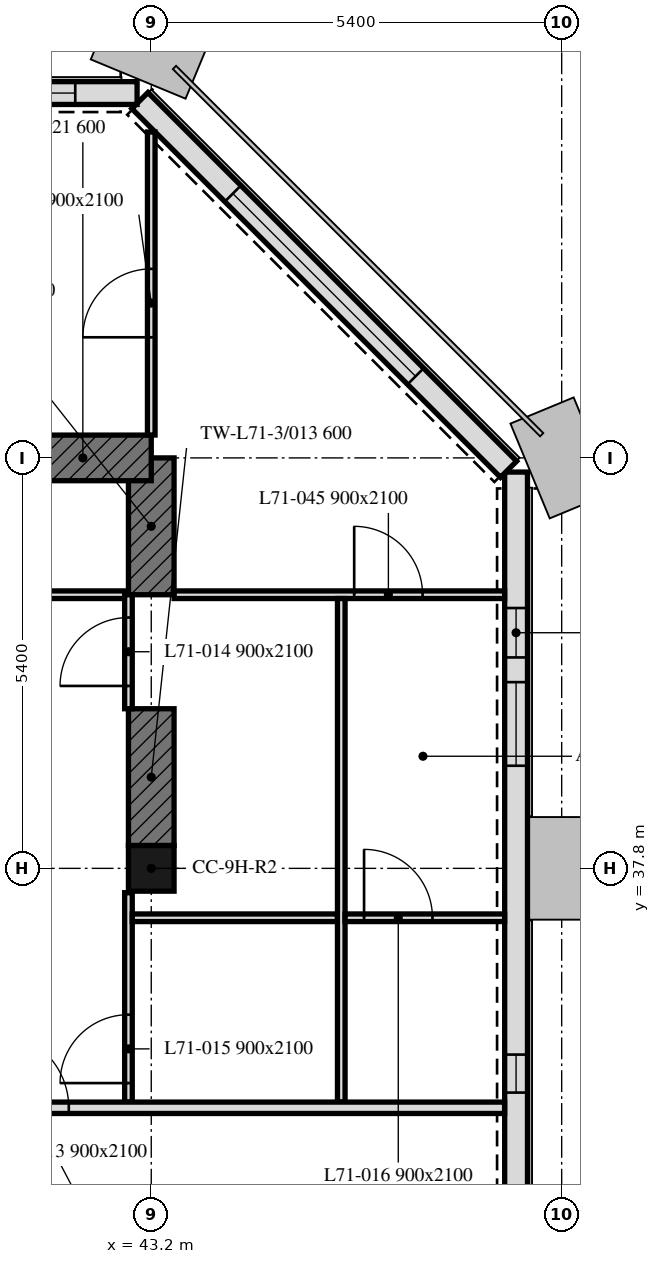
"""IFC4 building model, lengths in metres.
Left out: names, types, materials, properties, quantities, classifications, styles, units other than length and angle.
Written with IfcOpenShell. Run it as: python <this file> out.ifc"""

import sys

from ifc_helpers import new_model, si_unit, direction, frame, frame_2d, origin, origin_2d, place, context, subcontext, project, spatial, rectangle, extrude, element, fill, save


model = new_model("IFC4")
c1 = context("Model", 3, precision=1e-05, world=origin(), true_north=direction((0.0, 1.0)))
c2 = subcontext(c1, "Body", "Model", "MODEL_VIEW")
j1 = project(units=[si_unit("LENGTHUNIT", "METRE"), si_unit("PLANEANGLEUNIT", "RADIAN")], contexts=[c1])
p1 = place(None, origin())
s1 = spatial("IfcSite", under=j1, at=p1, CompositionType="ELEMENT")
p2 = place(p1, origin())
s2 = spatial("IfcBuilding", under=s1, at=p2, CompositionType="ELEMENT")
p3 = place(p2, frame((0.0, 0.0, 288.4)))
s3 = spatial("IfcBuildingStorey", under=s2, at=p3, CompositionType="ELEMENT", Elevation=288.4)
p4 = place(p3, frame((43.2, 37.8, 0.0), z_axis=(0.0, 0.0, 1.0), x_axis=(1.0, 0.0, 0.0)))
e1 = element("IfcColumn", 1, at=p4, inside=s3, PredefinedType="COLUMN", context=c2, shape_type="SweptSolid", body=[
    extrude(rectangle(XDim=0.6, YDim=0.6, at=origin_2d()), origin(), (0.0, 0.0, 1.0), 3.0),
])
p5 = place(p3, frame((43.2, 38.1, 0.0), z_axis=(0.0, 0.0, 1.0), x_axis=(0.0, 1.0, 0.0)))
e2 = element("IfcWall", 2, at=p5, inside=s3, PredefinedType="SHEAR", context=c2, shape_type="SweptSolid", body=[
    extrude(rectangle(XDim=1.8, YDim=0.6, at=frame_2d((0.9, 0.0))), origin(), (0.0, 0.0, 1.0), 3.0),
])
for number, where, z_axis, x_axis in (
    (3, (43.2, 41.4, 0.0), (0.0, 0.0, 1.0), (0.0, 1.0, 0.0)),
    (4, (41.4, 43.2, 0.0), (0.0, 0.0, 1.0), (1.0, 0.0, 0.0)),
):
    element("IfcWall", number, at=place(p3, frame(where, z_axis=z_axis, x_axis=x_axis)), inside=s3, PredefinedType="SHEAR", context=c2, shape_type="SweptSolid", body=[
        extrude(rectangle(XDim=1.8, YDim=0.6, at=frame_2d((0.9, 0.0))), origin(), (0.0, 0.0, 1.0), 3.0),
    ])
p6 = place(p3, frame((48.0, 10.986, 0.0), z_axis=(0.0, 0.0, 1.0), x_axis=(0.0, 1.0, 0.0)))
e5 = element("IfcWall", 5, at=p6, inside=s3, PredefinedType="SOLIDWALL", context=c2, shape_type="SweptSolid", body=[
    extrude(rectangle(XDim=32.027, YDim=0.3, at=frame_2d((16.014, 0.0))), origin(), (0.0, 0.0, 1.0), 3.0),
])
p7 = place(p6, frame((1.164, 0.0, 0.9)))
e6 = element("IfcOpeningElement", 6, at=p7, cuts=e5, PredefinedType="OPENING", context=c2, shape_type="SweptSolid", body=[
    extrude(rectangle(XDim=1.1, YDim=1.7, at=frame_2d((0.55, 0.85))), frame((0.0, 0.16, 0.0), z_axis=(0.0, -1.0, 0.0), x_axis=(1.0, 0.0, 0.0)), (0.0, 0.0, 1.0), 0.32),
])
p8 = place(p6, frame((3.114, 0.0, 0.9)))
e7 = element("IfcOpeningElement", 7, at=p8, cuts=e5, PredefinedType="OPENING", context=c2, shape_type="SweptSolid", body=[
    extrude(rectangle(XDim=1.1, YDim=1.7, at=frame_2d((0.55, 0.85))), frame((0.0, 0.16, 0.0), z_axis=(0.0, -1.0, 0.0), x_axis=(1.0, 0.0, 0.0)), (0.0, 0.0, 1.0), 0.32),
])
p9 = place(p6, frame((7.664, 0.0, 0.9)))
e8 = element("IfcOpeningElement", 8, at=p9, cuts=e5, PredefinedType="OPENING", context=c2, shape_type="SweptSolid", body=[
    extrude(rectangle(XDim=0.5, YDim=1.7, at=frame_2d((0.25, 0.85))), frame((0.0, 0.16, 0.0), z_axis=(0.0, -1.0, 0.0), x_axis=(1.0, 0.0, 0.0)), (0.0, 0.0, 1.0), 0.32),
])
p10 = place(p6, frame((13.064, 0.0, 0.9)))
e9 = element("IfcOpeningElement", 9, at=p10, cuts=e5, PredefinedType="OPENING", context=c2, shape_type="SweptSolid", body=[
    extrude(rectangle(XDim=0.5, YDim=1.7, at=frame_2d((0.25, 0.85))), frame((0.0, 0.16, 0.0), z_axis=(0.0, -1.0, 0.0), x_axis=(1.0, 0.0, 0.0)), (0.0, 0.0, 1.0), 0.32),
])
p11 = place(p6, frame((18.464, 0.0, 0.9)))
e10 = element("IfcOpeningElement", 10, at=p11, cuts=e5, PredefinedType="OPENING", context=c2, shape_type="SweptSolid", body=[
    extrude(rectangle(XDim=0.5, YDim=1.7, at=frame_2d((0.25, 0.85))), frame((0.0, 0.16, 0.0), z_axis=(0.0, -1.0, 0.0), x_axis=(1.0, 0.0, 0.0)), (0.0, 0.0, 1.0), 0.32),
])
p12 = place(p6, frame((23.864, 0.0, 0.9)))
e11 = element("IfcOpeningElement", 11, at=p12, cuts=e5, PredefinedType="OPENING", context=c2, shape_type="SweptSolid", body=[
    extrude(rectangle(XDim=0.5, YDim=1.7, at=frame_2d((0.25, 0.85))), frame((0.0, 0.16, 0.0), z_axis=(0.0, -1.0, 0.0), x_axis=(1.0, 0.0, 0.0)), (0.0, 0.0, 1.0), 0.32),
])
p13 = place(p6, frame((28.164, 0.0, 0.9)))
e12 = element("IfcOpeningElement", 12, at=p13, cuts=e5, PredefinedType="OPENING", context=c2, shape_type="SweptSolid", body=[
    extrude(rectangle(XDim=1.1, YDim=1.7, at=frame_2d((0.55, 0.85))), frame((0.0, 0.16, 0.0), z_axis=(0.0, -1.0, 0.0), x_axis=(1.0, 0.0, 0.0)), (0.0, 0.0, 1.0), 0.32),
])
p14 = place(p6, frame((29.589, 0.0, 0.9)))
e13 = element("IfcOpeningElement", 13, at=p14, cuts=e5, PredefinedType="OPENING", context=c2, shape_type="SweptSolid", body=[
    extrude(rectangle(XDim=0.65, YDim=1.7, at=frame_2d((0.325, 0.85))), frame((0.0, 0.16, 0.0), z_axis=(0.0, -1.0, 0.0), x_axis=(1.0, 0.0, 0.0)), (0.0, 0.0, 1.0), 0.32),
])
p15 = place(p3, frame((47.901, 43.051, 0.0), z_axis=(0.0, 0.0, 1.0), x_axis=(-0.707106781187, 0.707106781187, 0.0)))
e14 = element("IfcWall", 14, at=p15, inside=s3, PredefinedType="SOLIDWALL", context=c2, shape_type="SweptSolid", body=[
    extrude(rectangle(XDim=6.86, YDim=0.3, at=frame_2d((3.43, 0.0))), origin(), (0.0, 0.0, 1.0), 3.0),
])
p16 = place(p15, frame((1.73, 0.0, 0.9)))
e15 = element("IfcOpeningElement", 15, at=p16, cuts=e14, PredefinedType="OPENING", context=c2, shape_type="SweptSolid", body=[
    extrude(rectangle(XDim=3.4, YDim=1.7, at=frame_2d((1.7, 0.85))), frame((0.0, 0.16, 0.0), z_axis=(0.0, -1.0, 0.0), x_axis=(1.0, 0.0, 0.0)), (0.0, 0.0, 1.0), 0.32),
])
p17 = place(p3, frame((43.014, 48.0, 0.0), z_axis=(0.0, 0.0, 1.0), x_axis=(-1.0, 0.0, 0.0)))
e16 = element("IfcWall", 16, at=p17, inside=s3, PredefinedType="SOLIDWALL", context=c2, shape_type="SweptSolid", body=[
    extrude(rectangle(XDim=32.027, YDim=0.3, at=frame_2d((16.014, 0.0))), origin(), (0.0, 0.0, 1.0), 3.0),
])
p18 = place(p17, frame((0.814, 0.0, 0.9)))
e17 = element("IfcOpeningElement", 17, at=p18, cuts=e16, PredefinedType="OPENING", context=c2, shape_type="SweptSolid", body=[
    extrude(rectangle(XDim=3.4, YDim=1.7, at=frame_2d((1.7, 0.85))), frame((0.0, 0.16, 0.0), z_axis=(0.0, -1.0, 0.0), x_axis=(1.0, 0.0, 0.0)), (0.0, 0.0, 1.0), 0.32),
])
p19 = place(p17, frame((7.664, 0.0, 0.9)))
e18 = element("IfcOpeningElement", 18, at=p19, cuts=e16, PredefinedType="OPENING", context=c2, shape_type="SweptSolid", body=[
    extrude(rectangle(XDim=0.5, YDim=1.7, at=frame_2d((0.25, 0.85))), frame((0.0, 0.16, 0.0), z_axis=(0.0, -1.0, 0.0), x_axis=(1.0, 0.0, 0.0)), (0.0, 0.0, 1.0), 0.32),
])
p20 = place(p17, frame((13.064, 0.0, 0.9)))
e19 = element("IfcOpeningElement", 19, at=p20, cuts=e16, PredefinedType="OPENING", context=c2, shape_type="SweptSolid", body=[
    extrude(rectangle(XDim=0.5, YDim=1.7, at=frame_2d((0.25, 0.85))), frame((0.0, 0.16, 0.0), z_axis=(0.0, -1.0, 0.0), x_axis=(1.0, 0.0, 0.0)), (0.0, 0.0, 1.0), 0.32),
])
p21 = place(p17, frame((18.464, 0.0, 0.9)))
e20 = element("IfcOpeningElement", 20, at=p21, cuts=e16, PredefinedType="OPENING", context=c2, shape_type="SweptSolid", body=[
    extrude(rectangle(XDim=0.5, YDim=1.7, at=frame_2d((0.25, 0.85))), frame((0.0, 0.16, 0.0), z_axis=(0.0, -1.0, 0.0), x_axis=(1.0, 0.0, 0.0)), (0.0, 0.0, 1.0), 0.32),
])
p22 = place(p17, frame((23.864, 0.0, 0.9)))
e21 = element("IfcOpeningElement", 21, at=p22, cuts=e16, PredefinedType="OPENING", context=c2, shape_type="SweptSolid", body=[
    extrude(rectangle(XDim=0.5, YDim=1.7, at=frame_2d((0.25, 0.85))), frame((0.0, 0.16, 0.0), z_axis=(0.0, -1.0, 0.0), x_axis=(1.0, 0.0, 0.0)), (0.0, 0.0, 1.0), 0.32),
])
p23 = place(p17, frame((28.164, 0.0, 0.9)))
e22 = element("IfcOpeningElement", 22, at=p23, cuts=e16, PredefinedType="OPENING", context=c2, shape_type="SweptSolid", body=[
    extrude(rectangle(XDim=1.1, YDim=1.7, at=frame_2d((0.55, 0.85))), frame((0.0, 0.16, 0.0), z_axis=(0.0, -1.0, 0.0), x_axis=(1.0, 0.0, 0.0)), (0.0, 0.0, 1.0), 0.32),
])
p24 = place(p3, frame((43.2, 43.501, 0.0), z_axis=(0.0, 0.0, 1.0), x_axis=(0.0, 1.0, 0.0)))
e23 = element("IfcWall", 23, at=p24, inside=s3, PredefinedType="PARTITIONING", context=c2, shape_type="SweptSolid", body=[
    extrude(rectangle(XDim=3.987, YDim=0.1, at=frame_2d((1.993, 0.0))), origin(), (0.0, 0.0, 1.0), 3.0),
])
p25 = place(p24, frame((1.286, 0.0, 0.0)))
e24 = element("IfcOpeningElement", 24, at=p25, cuts=e23, PredefinedType="OPENING", context=c2, shape_type="SweptSolid", body=[
    extrude(rectangle(XDim=0.9, YDim=2.1, at=frame_2d((0.45, 1.05))), frame((0.0, 0.05, 0.0), z_axis=(0.0, -1.0, 0.0), x_axis=(1.0, 0.0, 0.0)), (0.0, 0.0, 1.0), 0.1),
])
p26 = place(p3, frame((37.875, 41.4, 0.0), z_axis=(0.0, 0.0, 1.0), x_axis=(1.0, 0.0, 0.0)))
e25 = element("IfcWall", 25, at=p26, inside=s3, PredefinedType="PARTITIONING", context=c2, shape_type="SweptSolid", body=[
    extrude(rectangle(XDim=5.024, YDim=0.1, at=frame_2d((2.512, 0.0))), origin(), (0.0, 0.0, 1.0), 3.0),
])
p27 = place(p26, frame((1.256, 0.0, 0.0)))
e26 = element("IfcOpeningElement", 26, at=p27, cuts=e25, PredefinedType="OPENING", context=c2, shape_type="SweptSolid", body=[
    extrude(rectangle(XDim=0.9, YDim=2.1, at=frame_2d((0.45, 1.05))), frame((0.0, 0.05, 0.0), z_axis=(0.0, -1.0, 0.0), x_axis=(1.0, 0.0, 0.0)), (0.0, 0.0, 1.0), 0.1),
])
p28 = place(p26, frame((2.626, 0.0, 0.0)))
e27 = element("IfcOpeningElement", 27, at=p28, cuts=e25, PredefinedType="OPENING", context=c2, shape_type="SweptSolid", body=[
    extrude(rectangle(XDim=0.9, YDim=2.1, at=frame_2d((0.45, 1.05))), frame((0.0, 0.05, 0.0), z_axis=(0.0, -1.0, 0.0), x_axis=(1.0, 0.0, 0.0)), (0.0, 0.0, 1.0), 0.1),
])
p29 = place(p3, frame((43.501, 41.4, 0.0), z_axis=(0.0, 0.0, 1.0), x_axis=(1.0, 0.0, 0.0)))
e28 = element("IfcWall", 28, at=p29, inside=s3, PredefinedType="PARTITIONING", context=c2, shape_type="SweptSolid", body=[
    extrude(rectangle(XDim=4.348, YDim=0.1, at=frame_2d((2.174, 0.0))), origin(), (0.0, 0.0, 1.0), 3.0),
])
p30 = place(p29, frame((2.369, 0.0, 0.0)))
e29 = element("IfcOpeningElement", 29, at=p30, cuts=e28, PredefinedType="OPENING", context=c2, shape_type="SweptSolid", body=[
    extrude(rectangle(XDim=0.9, YDim=2.1, at=frame_2d((0.45, 1.05))), frame((0.0, 0.05, 0.0), z_axis=(0.0, -1.0, 0.0), x_axis=(1.0, 0.0, 0.0)), (0.0, 0.0, 1.0), 0.1),
])
p31 = place(p3, frame((42.9, 34.725, 0.0), z_axis=(0.0, 0.0, 1.0), x_axis=(0.0, 1.0, 0.0)))
e30 = element("IfcWall", 30, at=p31, inside=s3, PredefinedType="PARTITIONING", context=c2, shape_type="SweptSolid", body=[
    extrude(rectangle(XDim=2.755, YDim=0.1, at=frame_2d((1.377, 0.0))), origin(), (0.0, 0.0, 1.0), 3.0),
])
p32 = place(p31, frame((0.25, 0.0, 0.0)))
e31 = element("IfcOpeningElement", 31, at=p32, cuts=e30, PredefinedType="OPENING", context=c2, shape_type="SweptSolid", body=[
    extrude(rectangle(XDim=0.9, YDim=2.1, at=frame_2d((0.45, 1.05))), frame((0.0, 0.05, 0.0), z_axis=(0.0, -1.0, 0.0), x_axis=(1.0, 0.0, 0.0)), (0.0, 0.0, 1.0), 0.1),
])
p33 = place(p3, frame((42.9, 39.9, 0.0), z_axis=(0.0, 0.0, 1.0), x_axis=(0.0, 1.0, 0.0)))
e32 = element("IfcWall", 32, at=p33, inside=s3, PredefinedType="PARTITIONING", context=c2, shape_type="SweptSolid", body=[
    extrude(rectangle(XDim=1.5, YDim=0.1, at=frame_2d((0.75, 0.0))), origin(), (0.0, 0.0, 1.0), 3.0),
])
p34 = place(p33, frame((0.3, 0.0, 0.0)))
e33 = element("IfcOpeningElement", 33, at=p34, cuts=e32, PredefinedType="OPENING", context=c2, shape_type="SweptSolid", body=[
    extrude(rectangle(XDim=0.9, YDim=2.1, at=frame_2d((0.45, 1.05))), frame((0.0, 0.05, 0.0), z_axis=(0.0, -1.0, 0.0), x_axis=(1.0, 0.0, 0.0)), (0.0, 0.0, 1.0), 0.1),
])
p35 = place(p3, frame((42.95, 37.15, 0.0), z_axis=(0.0, 0.0, 1.0), x_axis=(1.0, 0.0, 0.0)))
e34 = element("IfcWall", 34, at=p35, inside=s3, PredefinedType="PARTITIONING", context=c2, shape_type="SweptSolid", body=[
    extrude(rectangle(XDim=2.7, YDim=0.1, at=frame_2d((1.35, 0.0))), origin(), (0.0, 0.0, 1.0), 3.0),
])
p36 = place(p3, frame((45.7, 34.725, 0.0), z_axis=(0.0, 0.0, 1.0), x_axis=(0.0, 1.0, 0.0)))
e35 = element("IfcWall", 35, at=p36, inside=s3, PredefinedType="PARTITIONING", context=c2, shape_type="SweptSolid", body=[
    extrude(rectangle(XDim=6.625, YDim=0.1, at=frame_2d((3.312, 0.0))), origin(), (0.0, 0.0, 1.0), 2.4),
])
p37 = place(p3, frame((45.75, 37.15, 0.0), z_axis=(0.0, 0.0, 1.0), x_axis=(1.0, 0.0, 0.0)))
e36 = element("IfcWall", 36, at=p37, inside=s3, PredefinedType="PARTITIONING", context=c2, shape_type="SweptSolid", body=[
    extrude(rectangle(XDim=2.099, YDim=0.1, at=frame_2d((1.05, 0.0))), origin(), (0.0, 0.0, 1.0), 3.0),
])
p38 = place(p37, frame((0.25, 0.0, 0.0)))
e37 = element("IfcOpeningElement", 37, at=p38, cuts=e36, PredefinedType="OPENING", context=c2, shape_type="SweptSolid", body=[
    extrude(rectangle(XDim=0.9, YDim=2.1, at=frame_2d((0.45, 1.05))), frame((0.0, 0.05, 0.0), z_axis=(0.0, -1.0, 0.0), x_axis=(1.0, 0.0, 0.0)), (0.0, 0.0, 1.0), 0.1),
])
p39 = place(p3, frame((6.151, 34.65, 0.0), z_axis=(0.0, 0.0, 1.0), x_axis=(1.0, 0.0, 0.0)))
e38 = element("IfcWall", 38, at=p39, inside=s3, PredefinedType="PARTITIONING", context=c2, shape_type="SweptSolid", body=[
    extrude(rectangle(XDim=41.698, YDim=0.15, at=frame_2d((20.849, 0.0))), origin(), (0.0, 0.0, 1.0), 2.4),
])
p40 = place(p39, frame((2.969, 0.0, 0.0)))
e39 = element("IfcOpeningElement", 39, at=p40, cuts=e38, PredefinedType="OPENING", context=c2, shape_type="SweptSolid", body=[
    extrude(rectangle(XDim=1.0, YDim=2.1, at=frame_2d((0.5, 1.05))), frame((0.0, 0.075, 0.0), z_axis=(0.0, -1.0, 0.0), x_axis=(1.0, 0.0, 0.0)), (0.0, 0.0, 1.0), 0.15),
])
p41 = place(p39, frame((12.944, 0.0, 0.0)))
e40 = element("IfcOpeningElement", 40, at=p41, cuts=e38, PredefinedType="OPENING", context=c2, shape_type="SweptSolid", body=[
    extrude(rectangle(XDim=1.0, YDim=2.1, at=frame_2d((0.5, 1.05))), frame((0.0, 0.075, 0.0), z_axis=(0.0, -1.0, 0.0), x_axis=(1.0, 0.0, 0.0)), (0.0, 0.0, 1.0), 0.15),
])
p42 = place(p39, frame((24.444, 0.0, 0.0)))
e41 = element("IfcOpeningElement", 41, at=p42, cuts=e38, PredefinedType="OPENING", context=c2, shape_type="SweptSolid", body=[
    extrude(rectangle(XDim=1.0, YDim=2.1, at=frame_2d((0.5, 1.05))), frame((0.0, 0.075, 0.0), z_axis=(0.0, -1.0, 0.0), x_axis=(1.0, 0.0, 0.0)), (0.0, 0.0, 1.0), 0.15),
])
p43 = place(p39, frame((34.964, 0.0, 0.0)))
e42 = element("IfcOpeningElement", 42, at=p43, cuts=e38, PredefinedType="OPENING", context=c2, shape_type="SweptSolid", body=[
    extrude(rectangle(XDim=1.0, YDim=2.1, at=frame_2d((0.5, 1.05))), frame((0.0, 0.075, 0.0), z_axis=(0.0, -1.0, 0.0), x_axis=(1.0, 0.0, 0.0)), (0.0, 0.0, 1.0), 0.15),
])
p44 = place(p12, origin())
e43 = element("IfcWindow", 43, at=p44, inside=s3, PartitioningType="SINGLE_PANEL", PredefinedType="WINDOW", context=c2, shape_type="SweptSolid", body=[
    extrude(rectangle(XDim=0.5, YDim=1.7, at=frame_2d((0.25, 0.85))), frame((0.0, 0.03, 0.0), z_axis=(0.0, -1.0, 0.0), x_axis=(1.0, 0.0, 0.0)), (0.0, 0.0, 1.0), 0.06),
])
fill(e11, e43)
p45 = place(p13, origin())
e44 = element("IfcWindow", 44, at=p45, inside=s3, PartitioningType="SINGLE_PANEL", PredefinedType="WINDOW", context=c2, shape_type="SweptSolid", body=[
    extrude(rectangle(XDim=1.1, YDim=1.7, at=frame_2d((0.55, 0.85))), frame((0.0, 0.03, 0.0), z_axis=(0.0, -1.0, 0.0), x_axis=(1.0, 0.0, 0.0)), (0.0, 0.0, 1.0), 0.06),
])
fill(e12, e44)
p46 = place(p14, origin())
e45 = element("IfcWindow", 45, at=p46, inside=s3, PartitioningType="SINGLE_PANEL", PredefinedType="WINDOW", context=c2, shape_type="SweptSolid", body=[
    extrude(rectangle(XDim=0.65, YDim=1.7, at=frame_2d((0.325, 0.85))), frame((0.0, 0.03, 0.0), z_axis=(0.0, -1.0, 0.0), x_axis=(1.0, 0.0, 0.0)), (0.0, 0.0, 1.0), 0.06),
])
fill(e13, e45)
p47 = place(p16, origin())
e46 = element("IfcWindow", 46, at=p47, inside=s3, PartitioningType="SINGLE_PANEL", PredefinedType="WINDOW", context=c2, shape_type="SweptSolid", body=[
    extrude(rectangle(XDim=3.4, YDim=1.7, at=frame_2d((1.7, 0.85))), frame((0.0, 0.03, 0.0), z_axis=(0.0, -1.0, 0.0), x_axis=(1.0, 0.0, 0.0)), (0.0, 0.0, 1.0), 0.06),
])
fill(e15, e46)
p48 = place(p18, origin())
e47 = element("IfcWindow", 47, at=p48, inside=s3, PartitioningType="SINGLE_PANEL", PredefinedType="WINDOW", context=c2, shape_type="SweptSolid", body=[
    extrude(rectangle(XDim=3.4, YDim=1.7, at=frame_2d((1.7, 0.85))), frame((0.0, 0.03, 0.0), z_axis=(0.0, -1.0, 0.0), x_axis=(1.0, 0.0, 0.0)), (0.0, 0.0, 1.0), 0.06),
])
fill(e17, e47)
p49 = place(p34, origin())
e48 = element("IfcDoor", 48, at=p49, inside=s3, OperationType="SINGLE_SWING_LEFT", PredefinedType="DOOR", context=c2, shape_type="SweptSolid", body=[
    extrude(rectangle(XDim=0.9, YDim=2.1, at=frame_2d((0.45, 1.05))), frame((0.0, 0.025, 0.0), z_axis=(0.0, -1.0, 0.0), x_axis=(1.0, 0.0, 0.0)), (0.0, 0.0, 1.0), 0.05),
])
fill(e33, e48)
p50 = place(p32, origin())
e49 = element("IfcDoor", 49, at=p50, inside=s3, OperationType="SINGLE_SWING_LEFT", PredefinedType="DOOR", context=c2, shape_type="SweptSolid", body=[
    extrude(rectangle(XDim=0.9, YDim=2.1, at=frame_2d((0.45, 1.05))), frame((0.0, 0.025, 0.0), z_axis=(0.0, -1.0, 0.0), x_axis=(1.0, 0.0, 0.0)), (0.0, 0.0, 1.0), 0.05),
])
fill(e31, e49)
p51 = place(p38, origin())
e50 = element("IfcDoor", 50, at=p51, inside=s3, OperationType="SINGLE_SWING_LEFT", PredefinedType="DOOR", context=c2, shape_type="SweptSolid", body=[
    extrude(rectangle(XDim=0.9, YDim=2.1, at=frame_2d((0.45, 1.05))), frame((0.0, 0.025, 0.0), z_axis=(0.0, -1.0, 0.0), x_axis=(1.0, 0.0, 0.0)), (0.0, 0.0, 1.0), 0.05),
])
fill(e37, e50)
p52 = place(p25, origin())
e51 = element("IfcDoor", 51, at=p52, inside=s3, OperationType="SINGLE_SWING_LEFT", PredefinedType="DOOR", context=c2, shape_type="SweptSolid", body=[
    extrude(rectangle(XDim=0.9, YDim=2.1, at=frame_2d((0.45, 1.05))), frame((0.0, 0.025, 0.0), z_axis=(0.0, -1.0, 0.0), x_axis=(1.0, 0.0, 0.0)), (0.0, 0.0, 1.0), 0.05),
])
fill(e24, e51)
p53 = place(p30, origin())
e52 = element("IfcDoor", 52, at=p53, inside=s3, OperationType="SINGLE_SWING_RIGHT", PredefinedType="DOOR", context=c2, shape_type="SweptSolid", body=[
    extrude(rectangle(XDim=0.9, YDim=2.1, at=frame_2d((0.45, 1.05))), frame((0.0, 0.025, 0.0), z_axis=(0.0, -1.0, 0.0), x_axis=(1.0, 0.0, 0.0)), (0.0, 0.0, 1.0), 0.05),
])
fill(e29, e52)
p54 = place(p43, origin())
e53 = element("IfcDoor", 53, at=p54, inside=s3, OperationType="SINGLE_SWING_LEFT", PredefinedType="DOOR", context=c2, shape_type="SweptSolid", body=[
    extrude(rectangle(XDim=1.0, YDim=2.1, at=frame_2d((0.5, 1.05))), frame((0.0, 0.025, 0.0), z_axis=(0.0, -1.0, 0.0), x_axis=(1.0, 0.0, 0.0)), (0.0, 0.0, 1.0), 0.05),
])
fill(e42, e53)
save(model, sys.argv[1])
